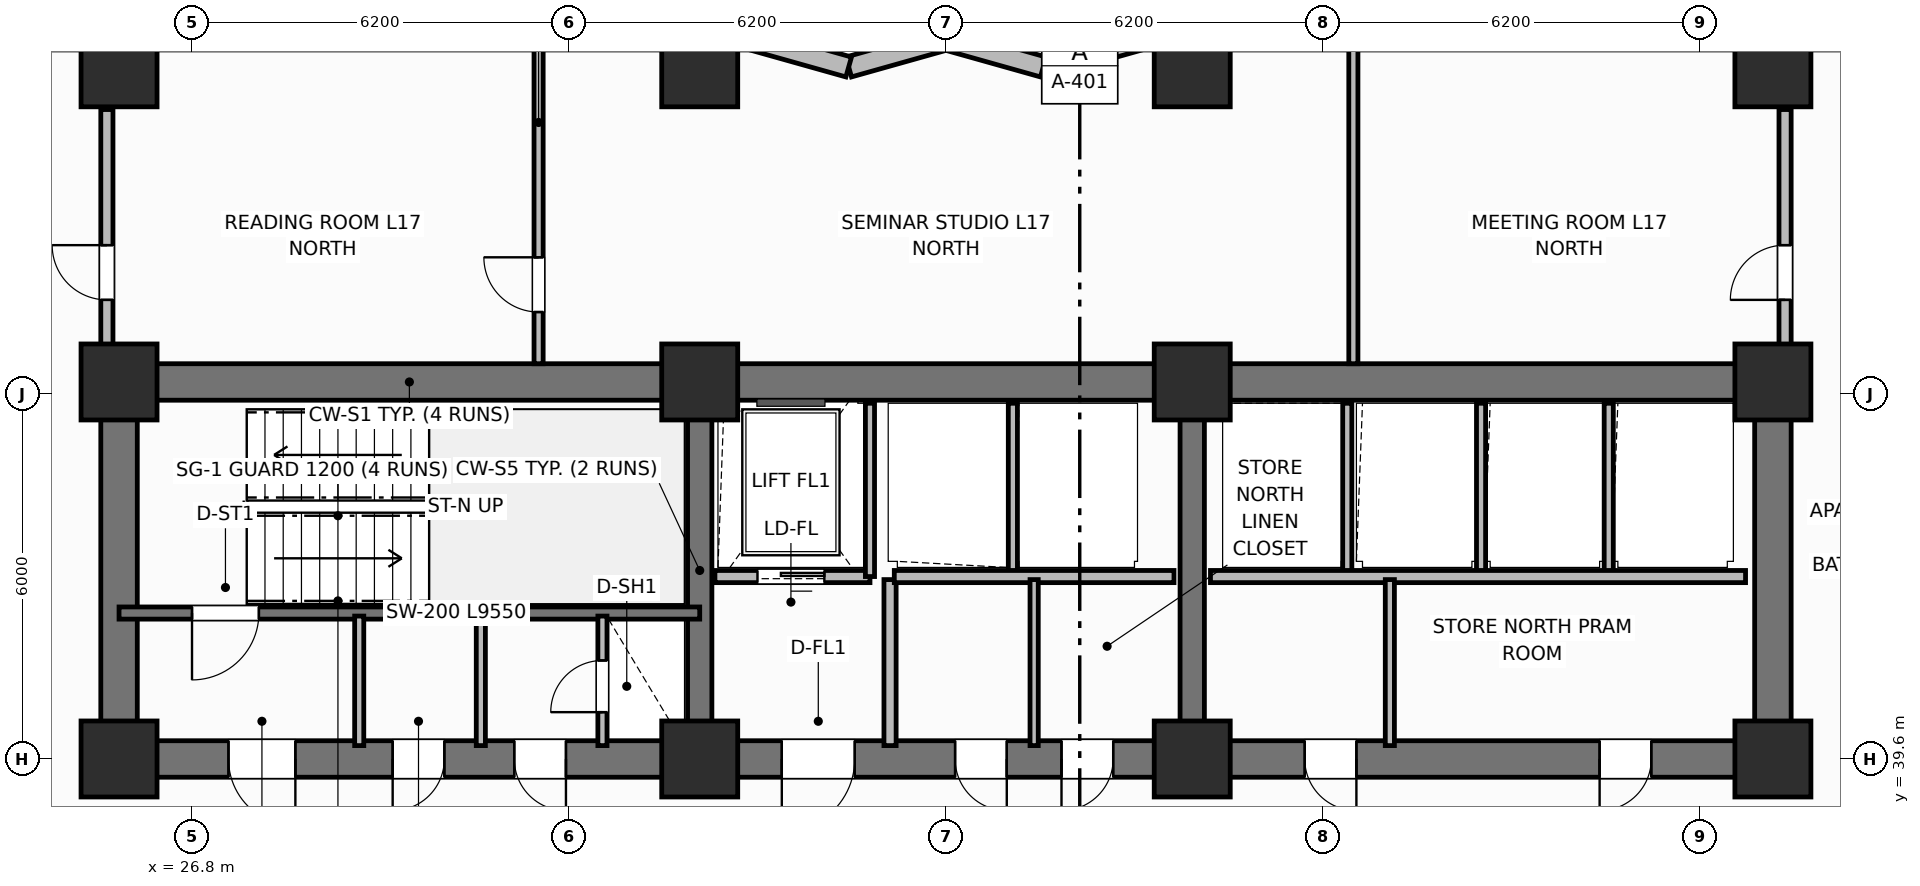
"""IFC4 building model, lengths in metres.
Left out: names, types, materials, properties, quantities, classifications, styles, units other than length and angle.
Written with IfcOpenShell. Run it as: python <this file> out.ifc"""

import sys

from ifc_helpers import new_model, si_unit, direction, frame, frame_2d, origin, origin_2d, place, context, subcontext, project, spatial, rectangle, extrude, element, fill, save


model = new_model("IFC4")
c1 = context("Model", 3, precision=1e-05, world=origin(), true_north=direction((0.0, 1.0)))
c2 = subcontext(c1, "Body", "Model", "MODEL_VIEW")
j1 = project(units=[si_unit("LENGTHUNIT", "METRE"), si_unit("PLANEANGLEUNIT", "RADIAN")], contexts=[c1])
p1 = place(None, origin())
s1 = spatial("IfcSite", under=j1, at=p1, CompositionType="ELEMENT")
p2 = place(p1, origin())
s2 = spatial("IfcBuilding", under=s1, at=p2, CompositionType="ELEMENT")
p3 = place(p2, frame((0.0, 0.0, 69.5)))
s3 = spatial("IfcBuildingStorey", under=s2, at=p3, CompositionType="ELEMENT", Elevation=69.5)
p4 = place(p3, frame((25.6, 45.8, 0.0), z_axis=(0.0, 0.0, 1.0), x_axis=(1.0, 0.0, 0.0)))
e1 = element("IfcWall", 1, at=p4, inside=s3, PredefinedType="SHEAR", context=c2, shape_type="SweptSolid", body=[
    extrude(rectangle(XDim=27.2, YDim=0.6, at=frame_2d((13.6, 0.0))), origin(), (0.0, 0.0, 1.0), 3.7),
])
for number, where, z_axis, x_axis in (
    (2, (25.6, 39.9, 0.0), (0.0, 0.0, 1.0), (0.0, 1.0, 0.0)),
    (3, (52.8, 39.9, 0.0), (0.0, 0.0, 1.0), (0.0, 1.0, 0.0)),
):
    element("IfcWall", number, at=place(p3, frame(where, z_axis=z_axis, x_axis=x_axis)), inside=s3, PredefinedType="SHEAR", context=c2, shape_type="SweptSolid", body=[
        extrude(rectangle(XDim=5.6, YDim=0.6, at=frame_2d((2.8, 0.0))), origin(), (0.0, 0.0, 1.0), 3.7),
    ])
p5 = place(p3, frame((52.8, 39.6, 0.0), z_axis=(0.0, 0.0, 1.0), x_axis=(-1.0, 0.0, 0.0)))
e4 = element("IfcWall", 4, at=p5, inside=s3, PredefinedType="SHEAR", context=c2, shape_type="SweptSolid", body=[
    extrude(rectangle(XDim=27.2, YDim=0.6, at=frame_2d((13.6, 0.0))), origin(), (0.0, 0.0, 1.0), 3.7),
])
p6 = place(p5, frame((24.3, 0.0, 0.0)))
e5 = element("IfcOpeningElement", 5, at=p6, cuts=e4, PredefinedType="OPENING", context=c2, shape_type="SweptSolid", body=[
    extrude(rectangle(XDim=1.1, YDim=2.15, at=frame_2d((0.55, 1.075))), frame((0.0, 0.31, 0.0), z_axis=(0.0, -1.0, 0.0), x_axis=(1.0, 0.0, 0.0)), (0.0, 0.0, 1.0), 0.62),
])
p7 = place(p5, frame((21.85, 0.0, 0.0)))
e6 = element("IfcOpeningElement", 6, at=p7, cuts=e4, PredefinedType="OPENING", context=c2, shape_type="SweptSolid", body=[
    extrude(rectangle(XDim=0.85, YDim=2.1, at=frame_2d((0.425, 1.05))), frame((0.0, 0.31, 0.0), z_axis=(0.0, -1.0, 0.0), x_axis=(1.0, 0.0, 0.0)), (0.0, 0.0, 1.0), 0.62),
])
p8 = place(p5, frame((19.85, 0.0, 0.0)))
e7 = element("IfcOpeningElement", 7, at=p8, cuts=e4, PredefinedType="OPENING", context=c2, shape_type="SweptSolid", body=[
    extrude(rectangle(XDim=0.85, YDim=2.1, at=frame_2d((0.425, 1.05))), frame((0.0, 0.31, 0.0), z_axis=(0.0, -1.0, 0.0), x_axis=(1.0, 0.0, 0.0)), (0.0, 0.0, 1.0), 0.62),
])
p9 = place(p5, frame((15.1, 0.0, 0.0)))
e8 = element("IfcOpeningElement", 8, at=p9, cuts=e4, PredefinedType="OPENING", context=c2, shape_type="SweptSolid", body=[
    extrude(rectangle(XDim=1.2, YDim=2.15, at=frame_2d((0.6, 1.075))), frame((0.0, 0.31, 0.0), z_axis=(0.0, -1.0, 0.0), x_axis=(1.0, 0.0, 0.0)), (0.0, 0.0, 1.0), 0.62),
])
p10 = place(p5, frame((12.6, 0.0, 0.0)))
e9 = element("IfcOpeningElement", 9, at=p10, cuts=e4, PredefinedType="OPENING", context=c2, shape_type="SweptSolid", body=[
    extrude(rectangle(XDim=0.85, YDim=2.1, at=frame_2d((0.425, 1.05))), frame((0.0, 0.31, 0.0), z_axis=(0.0, -1.0, 0.0), x_axis=(1.0, 0.0, 0.0)), (0.0, 0.0, 1.0), 0.62),
])
p11 = place(p5, frame((10.85, 0.0, 0.0)))
e10 = element("IfcOpeningElement", 10, at=p11, cuts=e4, PredefinedType="OPENING", context=c2, shape_type="SweptSolid", body=[
    extrude(rectangle(XDim=0.85, YDim=2.1, at=frame_2d((0.425, 1.05))), frame((0.0, 0.31, 0.0), z_axis=(0.0, -1.0, 0.0), x_axis=(1.0, 0.0, 0.0)), (0.0, 0.0, 1.0), 0.62),
])
p12 = place(p5, frame((6.85, 0.0, 0.0)))
e11 = element("IfcOpeningElement", 11, at=p12, cuts=e4, PredefinedType="OPENING", context=c2, shape_type="SweptSolid", body=[
    extrude(rectangle(XDim=0.85, YDim=2.1, at=frame_2d((0.425, 1.05))), frame((0.0, 0.31, 0.0), z_axis=(0.0, -1.0, 0.0), x_axis=(1.0, 0.0, 0.0)), (0.0, 0.0, 1.0), 0.62),
])
p13 = place(p5, frame((2.0, 0.0, 0.0)))
e12 = element("IfcOpeningElement", 12, at=p13, cuts=e4, PredefinedType="OPENING", context=c2, shape_type="SweptSolid", body=[
    extrude(rectangle(XDim=0.85, YDim=2.1, at=frame_2d((0.425, 1.05))), frame((0.0, 0.31, 0.0), z_axis=(0.0, -1.0, 0.0), x_axis=(1.0, 0.0, 0.0)), (0.0, 0.0, 1.0), 0.62),
])
for number, where, z_axis, x_axis in (
    (13, (35.15, 39.9, 0.0), (0.0, 0.0, 1.0), (0.0, 1.0, 0.0)),
    (14, (43.25, 39.9, 0.0), (0.0, 0.0, 1.0), (0.0, 1.0, 0.0)),
):
    element("IfcWall", number, at=place(p3, frame(where, z_axis=z_axis, x_axis=x_axis)), inside=s3, PredefinedType="SHEAR", context=c2, shape_type="SweptSolid", body=[
        extrude(rectangle(XDim=5.6, YDim=0.4, at=frame_2d((2.8, 0.0))), origin(), (0.0, 0.0, 1.0), 3.7),
    ])
for number, where, z_axis, x_axis in (
    (15, (25.6, 39.6, 0.0), (0.0, 0.0, 1.0), (1.0, 0.0, 0.0)),
    (16, (25.6, 45.8, 0.0), (0.0, 0.0, 1.0), (1.0, 0.0, 0.0)),
    (17, (35.15, 39.6, 0.0), (0.0, 0.0, 1.0), (1.0, 0.0, 0.0)),
    (18, (35.15, 45.8, 0.0), (0.0, 0.0, 1.0), (1.0, 0.0, 0.0)),
    (19, (43.25, 39.6, 0.0), (0.0, 0.0, 1.0), (1.0, 0.0, 0.0)),
    (20, (43.25, 45.8, 0.0), (0.0, 0.0, 1.0), (1.0, 0.0, 0.0)),
    (21, (52.8, 39.6, 0.0), (0.0, 0.0, 1.0), (1.0, 0.0, 0.0)),
    (22, (52.8, 45.8, 0.0), (0.0, 0.0, 1.0), (1.0, 0.0, 0.0)),
    (23, (25.6, 50.95, 0.0), (0.0, 0.0, 1.0), (1.0, 0.0, 0.0)),
    (24, (35.15, 50.95, 0.0), (0.0, 0.0, 1.0), (1.0, 0.0, 0.0)),
    (25, (43.25, 50.95, 0.0), (0.0, 0.0, 1.0), (1.0, 0.0, 0.0)),
    (26, (52.8, 50.95, 0.0), (0.0, 0.0, 1.0), (1.0, 0.0, 0.0)),
):
    element("IfcColumn", number, at=place(p3, frame(where, z_axis=z_axis, x_axis=x_axis)), inside=s3, PredefinedType="COLUMN", context=c2, shape_type="SweptSolid", body=[
        extrude(rectangle(XDim=1.25, YDim=1.25, at=origin_2d()), origin(), (0.0, 0.0, 1.0), 3.7),
    ])
p14 = place(p3, frame((42.4, 51.43, 0.0), z_axis=(0.0, 0.0, 1.0), x_axis=(-0.962652136636, -0.270741322725, 0.0)))
e27 = element("IfcWall", 27, at=p14, inside=s3, PredefinedType="SOLIDWALL", context=c2, shape_type="SweptSolid", body=[
    extrude(rectangle(XDim=1.662, YDim=0.34, at=frame_2d((0.831, 0.0))), origin(), (0.0, 0.0, 1.0), 2.7),
])
p15 = place(p3, frame((40.8, 50.98, 0.0), z_axis=(0.0, 0.0, 1.0), x_axis=(-0.962662902433, 0.270703040766, 0.0)))
e28 = element("IfcWall", 28, at=p15, inside=s3, PredefinedType="SOLIDWALL", context=c2, shape_type="SweptSolid", body=[
    extrude(rectangle(XDim=1.662, YDim=0.34, at=frame_2d((0.831, 0.0))), origin(), (0.0, 0.0, 1.0), 2.7),
])
p16 = place(p3, frame((39.2, 51.43, 0.0), z_axis=(0.0, 0.0, 1.0), x_axis=(-0.962652136636, -0.270741322725, 0.0)))
e29 = element("IfcWall", 29, at=p16, inside=s3, PredefinedType="SOLIDWALL", context=c2, shape_type="SweptSolid", body=[
    extrude(rectangle(XDim=1.662, YDim=0.34, at=frame_2d((0.831, 0.0))), origin(), (0.0, 0.0, 1.0), 2.7),
])
p17 = place(p3, frame((37.6, 50.98, 0.0), z_axis=(0.0, 0.0, 1.0), x_axis=(-0.962662902433, 0.270703040766, 0.0)))
e30 = element("IfcWall", 30, at=p17, inside=s3, PredefinedType="SOLIDWALL", context=c2, shape_type="SweptSolid", body=[
    extrude(rectangle(XDim=1.662, YDim=0.34, at=frame_2d((0.831, 0.0))), origin(), (0.0, 0.0, 1.0), 2.7),
])
p18 = place(p3, frame((35.15, 42.0, 0.0), z_axis=(0.0, 0.0, 1.0), x_axis=(-1.0, 0.0, 0.0)))
e31 = element("IfcWall", 31, at=p18, inside=s3, PredefinedType="SHEAR", context=c2, shape_type="SweptSolid", body=[
    extrude(rectangle(XDim=9.55, YDim=0.2, at=frame_2d((4.775, 0.0))), origin(), (0.0, 0.0, 1.0), 3.7),
])
p19 = place(p18, frame((7.25, 0.0, 0.0)))
e32 = element("IfcOpeningElement", 32, at=p19, cuts=e31, PredefinedType="OPENING", context=c2, shape_type="SweptSolid", body=[
    extrude(rectangle(XDim=1.1, YDim=2.15, at=frame_2d((0.55, 1.075))), frame((0.0, 0.11, 0.0), z_axis=(0.0, -1.0, 0.0), x_axis=(1.0, 0.0, 0.0)), (0.0, 0.0, 1.0), 0.22),
])
p20 = place(p3, frame((33.55, 39.82, 0.0), z_axis=(0.0, 0.0, 1.0), x_axis=(0.0, 1.0, 0.0)))
e33 = element("IfcWall", 33, at=p20, inside=s3, PredefinedType="PARTITIONING", context=c2, shape_type="SweptSolid", body=[
    extrude(rectangle(XDim=2.13, YDim=0.15, at=frame_2d((1.065, 0.0))), origin(), (0.0, 0.0, 1.0), 2.53),
])
p21 = place(p20, frame((0.55, 0.0, 0.0)))
e34 = element("IfcOpeningElement", 34, at=p21, cuts=e33, PredefinedType="OPENING", context=c2, shape_type="SweptSolid", body=[
    extrude(rectangle(XDim=0.85, YDim=2.05, at=frame_2d((0.425, 1.025))), frame((0.0, 0.085, 0.0), z_axis=(0.0, -1.0, 0.0), x_axis=(1.0, 0.0, 0.0)), (0.0, 0.0, 1.0), 0.17),
])
for number, where, z_axis, x_axis in (
    (35, (29.55, 39.82, 0.0), (0.0, 0.0, 1.0), (0.0, 1.0, 0.0)),
    (36, (31.55, 39.82, 0.0), (0.0, 0.0, 1.0), (0.0, 1.0, 0.0)),
):
    element("IfcWall", number, at=place(p3, frame(where, z_axis=z_axis, x_axis=x_axis)), inside=s3, PredefinedType="PARTITIONING", context=c2, shape_type="SweptSolid", body=[
        extrude(rectangle(XDim=2.13, YDim=0.15, at=frame_2d((1.065, 0.0))), origin(), (0.0, 0.0, 1.0), 2.53),
    ])
p22 = place(p3, frame((37.95, 42.6, 0.0), z_axis=(0.0, 0.0, 1.0), x_axis=(-1.0, 0.0, 0.0)))
e37 = element("IfcWall", 37, at=p22, inside=s3, PredefinedType="PARTITIONING", context=c2, shape_type="SweptSolid", body=[
    extrude(rectangle(XDim=2.55, YDim=0.2, at=frame_2d((1.275, 0.0))), origin(), (0.0, 0.0, 1.0), 2.3),
])
p23 = place(p22, frame((0.75, 0.0, 0.0)))
e38 = element("IfcOpeningElement", 38, at=p23, cuts=e37, PredefinedType="OPENING", context=c2, shape_type="SweptSolid", body=[
    extrude(rectangle(XDim=1.1, YDim=2.15, at=frame_2d((0.55, 1.075))), frame((0.0, 0.11, 0.0), z_axis=(0.0, -1.0, 0.0), x_axis=(1.0, 0.0, 0.0)), (0.0, 0.0, 1.0), 0.22),
])
p24 = place(p3, frame((37.95, 42.6, 0.0), z_axis=(0.0, 0.0, 1.0), x_axis=(0.0, 1.0, 0.0)))
e39 = element("IfcWall", 39, at=p24, inside=s3, PredefinedType="PARTITIONING", context=c2, shape_type="SweptSolid", body=[
    extrude(rectangle(XDim=2.85, YDim=0.15, at=frame_2d((1.425, 0.0))), origin(), (0.0, 0.0, 1.0), 2.53),
])
p25 = place(p3, frame((38.28, 39.82, 0.0), z_axis=(0.0, 0.0, 1.0), x_axis=(0.0, 1.0, 0.0)))
e40 = element("IfcWall", 40, at=p25, inside=s3, PredefinedType="PARTITIONING", context=c2, shape_type="SweptSolid", body=[
    extrude(rectangle(XDim=2.73, YDim=0.2, at=frame_2d((1.365, 0.0))), origin(), (0.0, 0.0, 1.0), 2.53),
])
p26 = place(p3, frame((40.3, 42.65, 0.0), z_axis=(0.0, 0.0, 1.0), x_axis=(0.0, 1.0, 0.0)))
e41 = element("IfcWall", 41, at=p26, inside=s3, PredefinedType="PARTITIONING", context=c2, shape_type="SweptSolid", body=[
    extrude(rectangle(XDim=2.8, YDim=0.15, at=frame_2d((1.4, 0.0))), origin(), (0.0, 0.0, 1.0), 2.53),
])
p27 = place(p3, frame((42.95, 42.6, 0.0), z_axis=(0.0, 0.0, 1.0), x_axis=(-1.0, 0.0, 0.0)))
e42 = element("IfcWall", 42, at=p27, inside=s3, PredefinedType="PARTITIONING", context=c2, shape_type="SweptSolid", body=[
    extrude(rectangle(XDim=4.6, YDim=0.2, at=frame_2d((2.3, 0.0))), origin(), (0.0, 0.0, 1.0), 2.3),
])
p28 = place(p3, frame((40.65, 39.82, 0.0), z_axis=(0.0, 0.0, 1.0), x_axis=(0.0, 1.0, 0.0)))
e43 = element("IfcWall", 43, at=p28, inside=s3, PredefinedType="PARTITIONING", context=c2, shape_type="SweptSolid", body=[
    extrude(rectangle(XDim=2.73, YDim=0.135, at=frame_2d((1.365, 0.0))), origin(), (0.0, 0.0, 1.0), 2.53),
])
for number, where, z_axis, x_axis in (
    (44, (45.8, 42.65, 0.0), (0.0, 0.0, 1.0), (0.0, 1.0, 0.0)),
    (45, (48.0, 42.65, 0.0), (0.0, 0.0, 1.0), (0.0, 1.0, 0.0)),
    (46, (50.1, 42.65, 0.0), (0.0, 0.0, 1.0), (0.0, 1.0, 0.0)),
):
    element("IfcWall", number, at=place(p3, frame(where, z_axis=z_axis, x_axis=x_axis)), inside=s3, PredefinedType="PARTITIONING", context=c2, shape_type="SweptSolid", body=[
        extrude(rectangle(XDim=2.8, YDim=0.15, at=frame_2d((1.4, 0.0))), origin(), (0.0, 0.0, 1.0), 2.53),
    ])
p29 = place(p3, frame((52.35, 42.6, 0.0), z_axis=(0.0, 0.0, 1.0), x_axis=(-1.0, 0.0, 0.0)))
e47 = element("IfcWall", 47, at=p29, inside=s3, PredefinedType="PARTITIONING", context=c2, shape_type="SweptSolid", body=[
    extrude(rectangle(XDim=8.8, YDim=0.2, at=frame_2d((4.4, 0.0))), origin(), (0.0, 0.0, 1.0), 2.53),
])
p30 = place(p3, frame((46.5, 39.82, 0.0), z_axis=(0.0, 0.0, 1.0), x_axis=(0.0, 1.0, 0.0)))
e48 = element("IfcWall", 48, at=p30, inside=s3, PredefinedType="PARTITIONING", context=c2, shape_type="SweptSolid", body=[
    extrude(rectangle(XDim=2.73, YDim=0.15, at=frame_2d((1.365, 0.0))), origin(), (0.0, 0.0, 1.0), 2.53),
])
p31 = place(p3, frame((32.5, 46.1, 0.0), z_axis=(0.0, 0.0, 1.0), x_axis=(0.0, 1.0, 0.0)))
e49 = element("IfcWall", 49, at=p31, inside=s3, PredefinedType="PARTITIONING", context=c2, shape_type="SweptSolid", body=[
    extrude(rectangle(XDim=5.33, YDim=0.15, at=frame_2d((2.665, 0.0))), origin(), (0.0, 0.0, 1.0), 2.53),
])
p32 = place(p31, frame((0.85, 0.0, 0.0)))
e50 = element("IfcOpeningElement", 50, at=p32, cuts=e49, PredefinedType="OPENING", context=c2, shape_type="SweptSolid", body=[
    extrude(rectangle(XDim=0.9, YDim=2.1, at=frame_2d((0.45, 1.05))), frame((0.0, 0.085, 0.0), z_axis=(0.0, -1.0, 0.0), x_axis=(1.0, 0.0, 0.0)), (0.0, 0.0, 1.0), 0.17),
])
p33 = place(p3, frame((45.9, 46.1, 0.0), z_axis=(0.0, 0.0, 1.0), x_axis=(0.0, 1.0, 0.0)))
e51 = element("IfcWall", 51, at=p33, inside=s3, PredefinedType="PARTITIONING", context=c2, shape_type="SweptSolid", body=[
    extrude(rectangle(XDim=5.33, YDim=0.15, at=frame_2d((2.665, 0.0))), origin(), (0.0, 0.0, 1.0), 2.53),
])
p34 = place(p3, frame((25.4, 46.1, 0.0), z_axis=(0.0, 0.0, 1.0), x_axis=(0.0, 1.0, 0.0)))
e52 = element("IfcWall", 52, at=p34, inside=s3, PredefinedType="PARTITIONING", context=c2, shape_type="SweptSolid", body=[
    extrude(rectangle(XDim=4.18, YDim=0.2, at=frame_2d((2.09, 0.0))), origin(), (0.0, 0.0, 1.0), 2.53),
])
p35 = place(p34, frame((1.05, 0.0, 0.0)))
e53 = element("IfcOpeningElement", 53, at=p35, cuts=e52, PredefinedType="OPENING", context=c2, shape_type="SweptSolid", body=[
    extrude(rectangle(XDim=0.9, YDim=2.1, at=frame_2d((0.45, 1.05))), frame((0.0, 0.11, 0.0), z_axis=(0.0, -1.0, 0.0), x_axis=(1.0, 0.0, 0.0)), (0.0, 0.0, 1.0), 0.22),
])
p36 = place(p3, frame((53.0, 46.1, 0.0), z_axis=(0.0, 0.0, 1.0), x_axis=(0.0, 1.0, 0.0)))
e54 = element("IfcWall", 54, at=p36, inside=s3, PredefinedType="PARTITIONING", context=c2, shape_type="SweptSolid", body=[
    extrude(rectangle(XDim=4.18, YDim=0.2, at=frame_2d((2.09, 0.0))), origin(), (0.0, 0.0, 1.0), 2.53),
])
p37 = place(p36, frame((1.05, 0.0, 0.0)))
e55 = element("IfcOpeningElement", 55, at=p37, cuts=e54, PredefinedType="OPENING", context=c2, shape_type="SweptSolid", body=[
    extrude(rectangle(XDim=0.9, YDim=2.1, at=frame_2d((0.45, 1.05))), frame((0.0, 0.11, 0.0), z_axis=(0.0, -1.0, 0.0), x_axis=(1.0, 0.0, 0.0)), (0.0, 0.0, 1.0), 0.22),
])
p38 = place(p19, origin())
e56 = element("IfcDoor", 56, at=p38, inside=s3, OperationType="SINGLE_SWING_RIGHT", PredefinedType="DOOR", context=c2, shape_type="SweptSolid", body=[
    extrude(rectangle(XDim=1.1, YDim=2.15, at=frame_2d((0.55, 1.075))), frame((0.0, 0.025, 0.0), z_axis=(0.0, -1.0, 0.0), x_axis=(1.0, 0.0, 0.0)), (0.0, 0.0, 1.0), 0.05),
])
fill(e32, e56)
p39 = place(p21, origin())
e57 = element("IfcDoor", 57, at=p39, inside=s3, OperationType="SINGLE_SWING_LEFT", PredefinedType="TRAPDOOR", context=c2, shape_type="SweptSolid", body=[
    extrude(rectangle(XDim=0.85, YDim=2.05, at=frame_2d((0.425, 1.025))), frame((0.0, 0.025, 0.0), z_axis=(0.0, -1.0, 0.0), x_axis=(1.0, 0.0, 0.0)), (0.0, 0.0, 1.0), 0.05),
])
fill(e34, e57)
p40 = place(p23, origin())
e58 = element("IfcDoor", 58, at=p40, inside=s3, OperationType="SLIDING_TO_LEFT", PredefinedType="DOOR", context=c2, shape_type="SweptSolid", body=[
    extrude(rectangle(XDim=1.1, YDim=2.15, at=frame_2d((0.55, 1.075))), frame((0.0, 0.025, 0.0), z_axis=(0.0, -1.0, 0.0), x_axis=(1.0, 0.0, 0.0)), (0.0, 0.0, 1.0), 0.05),
])
fill(e38, e58)
p41 = place(p32, origin())
e59 = element("IfcDoor", 59, at=p41, inside=s3, OperationType="SINGLE_SWING_RIGHT", PredefinedType="DOOR", context=c2, shape_type="SweptSolid", body=[
    extrude(rectangle(XDim=0.9, YDim=2.1, at=frame_2d((0.45, 1.05))), frame((0.0, 0.025, 0.0), z_axis=(0.0, -1.0, 0.0), x_axis=(1.0, 0.0, 0.0)), (0.0, 0.0, 1.0), 0.05),
])
fill(e50, e59)
p42 = place(p35, origin())
e60 = element("IfcDoor", 60, at=p42, inside=s3, OperationType="SINGLE_SWING_RIGHT", PredefinedType="DOOR", context=c2, shape_type="SweptSolid", body=[
    extrude(rectangle(XDim=0.9, YDim=2.1, at=frame_2d((0.45, 1.05))), frame((0.0, 0.025, 0.0), z_axis=(0.0, -1.0, 0.0), x_axis=(1.0, 0.0, 0.0)), (0.0, 0.0, 1.0), 0.05),
])
fill(e53, e60)
p43 = place(p37, origin())
e61 = element("IfcDoor", 61, at=p43, inside=s3, OperationType="SINGLE_SWING_LEFT", PredefinedType="DOOR", context=c2, shape_type="SweptSolid", body=[
    extrude(rectangle(XDim=0.9, YDim=2.1, at=frame_2d((0.45, 1.05))), frame((0.0, 0.025, 0.0), z_axis=(0.0, -1.0, 0.0), x_axis=(1.0, 0.0, 0.0)), (0.0, 0.0, 1.0), 0.05),
])
fill(e55, e61)
p44 = place(p6, origin())
e62 = element("IfcDoor", 62, at=p44, inside=s3, OperationType="SINGLE_SWING_LEFT", PredefinedType="DOOR", context=c2, shape_type="SweptSolid", body=[
    extrude(rectangle(XDim=1.1, YDim=2.15, at=frame_2d((0.55, 1.075))), frame((0.0, 0.025, 0.0), z_axis=(0.0, -1.0, 0.0), x_axis=(1.0, 0.0, 0.0)), (0.0, 0.0, 1.0), 0.05),
])
fill(e5, e62)
p45 = place(p7, origin())
e63 = element("IfcDoor", 63, at=p45, inside=s3, OperationType="SINGLE_SWING_RIGHT", PredefinedType="DOOR", context=c2, shape_type="SweptSolid", body=[
    extrude(rectangle(XDim=0.85, YDim=2.1, at=frame_2d((0.425, 1.05))), frame((0.0, 0.025, 0.0), z_axis=(0.0, -1.0, 0.0), x_axis=(1.0, 0.0, 0.0)), (0.0, 0.0, 1.0), 0.05),
])
fill(e6, e63)
p46 = place(p8, origin())
e64 = element("IfcDoor", 64, at=p46, inside=s3, OperationType="SINGLE_SWING_LEFT", PredefinedType="DOOR", context=c2, shape_type="SweptSolid", body=[
    extrude(rectangle(XDim=0.85, YDim=2.1, at=frame_2d((0.425, 1.05))), frame((0.0, 0.025, 0.0), z_axis=(0.0, -1.0, 0.0), x_axis=(1.0, 0.0, 0.0)), (0.0, 0.0, 1.0), 0.05),
])
fill(e7, e64)
p47 = place(p9, origin())
e65 = element("IfcDoor", 65, at=p47, inside=s3, OperationType="SINGLE_SWING_RIGHT", PredefinedType="DOOR", context=c2, shape_type="SweptSolid", body=[
    extrude(rectangle(XDim=1.2, YDim=2.15, at=frame_2d((0.6, 1.075))), frame((0.0, 0.025, 0.0), z_axis=(0.0, -1.0, 0.0), x_axis=(1.0, 0.0, 0.0)), (0.0, 0.0, 1.0), 0.05),
])
fill(e8, e65)
p48 = place(p10, origin())
e66 = element("IfcDoor", 66, at=p48, inside=s3, OperationType="SINGLE_SWING_LEFT", PredefinedType="DOOR", context=c2, shape_type="SweptSolid", body=[
    extrude(rectangle(XDim=0.85, YDim=2.1, at=frame_2d((0.425, 1.05))), frame((0.0, 0.025, 0.0), z_axis=(0.0, -1.0, 0.0), x_axis=(1.0, 0.0, 0.0)), (0.0, 0.0, 1.0), 0.05),
])
fill(e9, e66)
p49 = place(p11, origin())
e67 = element("IfcDoor", 67, at=p49, inside=s3, OperationType="SINGLE_SWING_RIGHT", PredefinedType="DOOR", context=c2, shape_type="SweptSolid", body=[
    extrude(rectangle(XDim=0.85, YDim=2.1, at=frame_2d((0.425, 1.05))), frame((0.0, 0.025, 0.0), z_axis=(0.0, -1.0, 0.0), x_axis=(1.0, 0.0, 0.0)), (0.0, 0.0, 1.0), 0.05),
])
fill(e10, e67)
p50 = place(p12, origin())
e68 = element("IfcDoor", 68, at=p50, inside=s3, OperationType="SINGLE_SWING_LEFT", PredefinedType="DOOR", context=c2, shape_type="SweptSolid", body=[
    extrude(rectangle(XDim=0.85, YDim=2.1, at=frame_2d((0.425, 1.05))), frame((0.0, 0.025, 0.0), z_axis=(0.0, -1.0, 0.0), x_axis=(1.0, 0.0, 0.0)), (0.0, 0.0, 1.0), 0.05),
])
fill(e11, e68)
p51 = place(p13, origin())
e69 = element("IfcDoor", 69, at=p51, inside=s3, OperationType="SINGLE_SWING_RIGHT", PredefinedType="DOOR", context=c2, shape_type="SweptSolid", body=[
    extrude(rectangle(XDim=0.85, YDim=2.1, at=frame_2d((0.425, 1.05))), frame((0.0, 0.025, 0.0), z_axis=(0.0, -1.0, 0.0), x_axis=(1.0, 0.0, 0.0)), (0.0, 0.0, 1.0), 0.05),
])
fill(e12, e69)
save(model, sys.argv[1])
